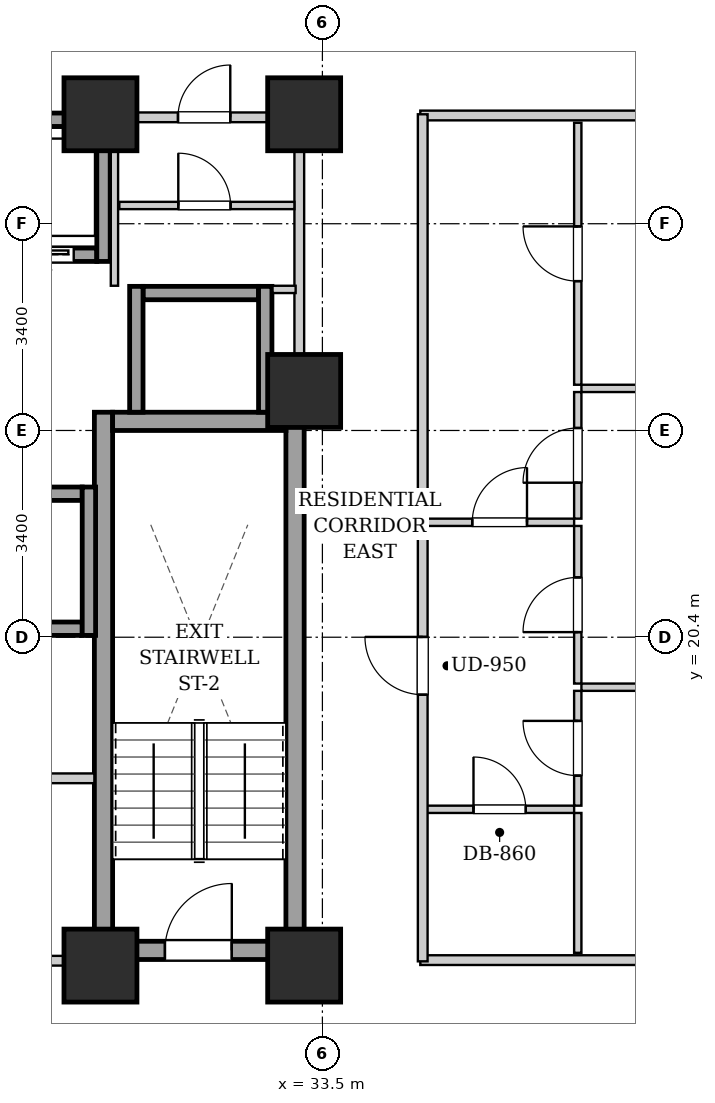
"""IFC4 building model, lengths in metres.
Left out: names, types, materials, properties, quantities, classifications, styles, units other than length and angle.
Written with IfcOpenShell. Run it as: python <this file> out.ifc"""

import sys

from ifc_helpers import new_model, si_unit, direction, frame, frame_2d, origin, origin_2d, place, context, subcontext, project, spatial, rectangle, extrude, element, fill, save


model = new_model("IFC4")
c1 = context("Model", 3, precision=1e-05, world=origin(), true_north=direction((0.0, 1.0)))
c2 = subcontext(c1, "Body", "Model", "MODEL_VIEW")
j1 = project(units=[si_unit("LENGTHUNIT", "METRE"), si_unit("PLANEANGLEUNIT", "RADIAN")], contexts=[c1])
p1 = place(None, origin())
s1 = spatial("IfcSite", under=j1, at=p1, CompositionType="ELEMENT")
p2 = place(p1, origin())
s2 = spatial("IfcBuilding", under=s1, at=p2, CompositionType="ELEMENT")
p3 = place(p2, frame((0.0, 0.0, 61.0)))
s3 = spatial("IfcBuildingStorey", under=s2, at=p3, CompositionType="ELEMENT", Elevation=61.0)
for number, where, z_axis, x_axis in (
    (1, (29.85, 15.0, 0.0), (0.0, 0.0, 1.0), (1.0, 0.0, 0.0)),
    (2, (33.2, 15.0, 0.0), (0.0, 0.0, 1.0), (1.0, 0.0, 0.0)),
    (3, (29.85, 29.0, 0.0), (0.0, 0.0, 1.0), (1.0, 0.0, 0.0)),
    (4, (33.2, 29.0, 0.0), (0.0, 0.0, 1.0), (1.0, 0.0, 0.0)),
    (5, (33.2, 24.45, 0.0), (0.0, 0.0, 1.0), (1.0, 0.0, 0.0)),
):
    element("IfcColumn", number, at=place(p3, frame(where, z_axis=z_axis, x_axis=x_axis)), inside=s3, PredefinedType="COLUMN", context=c2, shape_type="SweptSolid", body=[
        extrude(rectangle(XDim=1.2, YDim=1.2, at=origin_2d()), origin(), (0.0, 0.0, 1.0), 3.2),
    ])
for number, where, z_axis, x_axis in (
    (6, (29.9, 15.1, 0.0), (0.0, 0.0, 1.0), (0.0, 1.0, 0.0)),
    (7, (33.05, 15.1, 0.0), (0.0, 0.0, 1.0), (0.0, 1.0, 0.0)),
):
    element("IfcWall", number, at=place(p3, frame(where, z_axis=z_axis, x_axis=x_axis)), inside=s3, PredefinedType="SHEAR", context=c2, shape_type="SweptSolid", body=[
        extrude(rectangle(XDim=9.0, YDim=0.3, at=frame_2d((4.5, 0.0))), origin(), (0.0, 0.0, 1.0), 2.94),
    ])
p4 = place(p3, frame((30.05, 23.95, 0.0), z_axis=(0.0, 0.0, 1.0), x_axis=(1.0, 0.0, 0.0)))
e8 = element("IfcWall", 8, at=p4, inside=s3, PredefinedType="SHEAR", context=c2, shape_type="SweptSolid", body=[
    extrude(rectangle(XDim=2.85, YDim=0.3, at=frame_2d((1.425, 0.0))), origin(), (0.0, 0.0, 1.0), 2.94),
])
p5 = place(p3, frame((30.05, 15.25, 0.0), z_axis=(0.0, 0.0, 1.0), x_axis=(1.0, 0.0, 0.0)))
e9 = element("IfcWall", 9, at=p5, inside=s3, PredefinedType="SHEAR", context=c2, shape_type="SweptSolid", body=[
    extrude(rectangle(XDim=2.85, YDim=0.3, at=frame_2d((1.425, 0.0))), origin(), (0.0, 0.0, 1.0), 2.94),
])
p6 = place(p5, frame((0.86, 0.0, 0.0)))
e10 = element("IfcOpeningElement", 10, at=p6, cuts=e9, PredefinedType="OPENING", context=c2, shape_type="SweptSolid", body=[
    extrude(rectangle(XDim=1.1, YDim=2.05, at=frame_2d((0.55, 1.025))), frame((0.0, 0.16, 0.0), z_axis=(0.0, -1.0, 0.0), x_axis=(1.0, 0.0, 0.0)), (0.0, 0.0, 1.0), 0.32),
])
p7 = place(p3, frame((27.93, 26.69, 0.0), z_axis=(0.0, 0.0, 1.0), x_axis=(1.0, 0.0, 0.0)))
e11 = element("IfcWall", 11, at=p7, inside=s3, PredefinedType="SHEAR", context=c2, shape_type="SweptSolid", body=[
    extrude(rectangle(XDim=1.86, YDim=0.22, at=frame_2d((0.93, 0.0))), origin(), (0.0, 0.0, 1.0), 2.94),
])
p8 = place(p7, frame((0.38, 0.0, 0.0)))
e12 = element("IfcOpeningElement", 12, at=p8, cuts=e11, PredefinedType="OPENING", context=c2, shape_type="SweptSolid", body=[
    extrude(rectangle(XDim=1.1, YDim=2.15, at=frame_2d((0.55, 1.075))), frame((0.0, 0.12, 0.0), z_axis=(0.0, -1.0, 0.0), x_axis=(1.0, 0.0, 0.0)), (0.0, 0.0, 1.0), 0.24),
])
p9 = place(p3, frame((27.93, 28.91, 0.0), z_axis=(0.0, 0.0, 1.0), x_axis=(1.0, 0.0, 0.0)))
e13 = element("IfcWall", 13, at=p9, inside=s3, PredefinedType="SHEAR", context=c2, shape_type="SweptSolid", body=[
    extrude(rectangle(XDim=1.86, YDim=0.22, at=frame_2d((0.93, 0.0))), origin(), (0.0, 0.0, 1.0), 2.94),
])
p10 = place(p3, frame((29.9, 26.58, 0.0), z_axis=(0.0, 0.0, 1.0), x_axis=(0.0, 1.0, 0.0)))
e14 = element("IfcWall", 14, at=p10, inside=s3, PredefinedType="SHEAR", context=c2, shape_type="SweptSolid", body=[
    extrude(rectangle(XDim=2.44, YDim=0.22, at=frame_2d((1.22, 0.0))), origin(), (0.0, 0.0, 1.0), 2.94),
])
for number, where, z_axis, x_axis in (
    (15, (27.65, 20.54, 0.0), (0.0, 0.0, 1.0), (1.0, 0.0, 0.0)),
    (16, (27.65, 22.76, 0.0), (0.0, 0.0, 1.0), (1.0, 0.0, 0.0)),
):
    element("IfcWall", number, at=place(p3, frame(where, z_axis=z_axis, x_axis=x_axis)), inside=s3, PredefinedType="SHEAR", context=c2, shape_type="SweptSolid", body=[
        extrude(rectangle(XDim=1.9, YDim=0.22, at=frame_2d((0.95, 0.0))), origin(), (0.0, 0.0, 1.0), 2.94),
    ])
p11 = place(p3, frame((29.66, 20.43, 0.0), z_axis=(0.0, 0.0, 1.0), x_axis=(0.0, 1.0, 0.0)))
e17 = element("IfcWall", 17, at=p11, inside=s3, PredefinedType="SHEAR", context=c2, shape_type="SweptSolid", body=[
    extrude(rectangle(XDim=2.44, YDim=0.22, at=frame_2d((1.22, 0.0))), origin(), (0.0, 0.0, 1.0), 2.94),
])
p12 = place(p3, frame((30.55, 26.06, 0.0), z_axis=(0.0, 0.0, 1.0), x_axis=(1.0, 0.0, 0.0)))
e18 = element("IfcWall", 18, at=p12, inside=s3, PredefinedType="SHEAR", context=c2, shape_type="SweptSolid", body=[
    extrude(rectangle(XDim=1.9, YDim=0.22, at=frame_2d((0.95, 0.0))), origin(), (0.0, 0.0, 1.0), 2.94),
])
for number, where, z_axis, x_axis in (
    (19, (30.44, 24.1, 0.0), (0.0, 0.0, 1.0), (0.0, 1.0, 0.0)),
    (20, (32.56, 24.1, 0.0), (0.0, 0.0, 1.0), (0.0, 1.0, 0.0)),
):
    element("IfcWall", number, at=place(p3, frame(where, z_axis=z_axis, x_axis=x_axis)), inside=s3, PredefinedType="SHEAR", context=c2, shape_type="SweptSolid", body=[
        extrude(rectangle(XDim=2.07, YDim=0.22, at=frame_2d((1.035, 0.0))), origin(), (0.0, 0.0, 1.0), 2.94),
    ])
p13 = place(p3, frame((21.25, 15.08, 0.0), z_axis=(0.0, 0.0, 1.0), x_axis=(1.0, 0.0, 0.0)))
e21 = element("IfcWall", 21, at=p13, inside=s3, PredefinedType="PARTITIONING", context=c2, shape_type="SweptSolid", body=[
    extrude(rectangle(XDim=8.5, YDim=0.16, at=frame_2d((4.25, 0.0))), origin(), (0.0, 0.0, 1.0), 2.232),
])
p14 = place(p13, frame((3.725, 0.0, 0.0)))
e22 = element("IfcOpeningElement", 22, at=p14, cuts=e21, PredefinedType="OPENING", context=c2, shape_type="SweptSolid", body=[
    extrude(rectangle(XDim=1.05, YDim=2.05, at=frame_2d((0.525, 1.025))), frame((0.0, 0.09, 0.0), z_axis=(0.0, -1.0, 0.0), x_axis=(1.0, 0.0, 0.0)), (0.0, 0.0, 1.0), 0.18),
])
p15 = place(p3, frame((28.65, 18.08, 0.0), z_axis=(0.0, 0.0, 1.0), x_axis=(1.0, 0.0, 0.0)))
e23 = element("IfcWall", 23, at=p15, inside=s3, PredefinedType="PARTITIONING", context=c2, shape_type="SweptSolid", body=[
    extrude(rectangle(XDim=1.1, YDim=0.16, at=frame_2d((0.55, 0.0))), origin(), (0.0, 0.0, 1.0), 2.94),
])
p16 = place(p3, frame((33.12, 24.12, 0.0), z_axis=(0.0, 0.0, 1.0), x_axis=(0.0, 1.0, 0.0)))
e24 = element("IfcWall", 24, at=p16, inside=s3, PredefinedType="PARTITIONING", context=c2, shape_type="SweptSolid", body=[
    extrude(rectangle(XDim=4.76, YDim=0.16, at=frame_2d((2.38, 0.0))), origin(), (0.0, 0.0, 1.0), 2.94),
])
p17 = place(p3, frame((30.08, 26.18, 0.0), z_axis=(0.0, 0.0, 1.0), x_axis=(0.0, 1.0, 0.0)))
e25 = element("IfcWall", 25, at=p17, inside=s3, PredefinedType="PARTITIONING", context=c2, shape_type="SweptSolid", body=[
    extrude(rectangle(XDim=2.68, YDim=0.12, at=frame_2d((1.34, 0.0))), origin(), (0.0, 0.0, 1.0), 2.94),
])
p18 = place(p3, frame((32.68, 26.12, 0.0), z_axis=(0.0, 0.0, 1.0), x_axis=(1.0, 0.0, 0.0)))
e26 = element("IfcWall", 26, at=p18, inside=s3, PredefinedType="PARTITIONING", context=c2, shape_type="SweptSolid", body=[
    extrude(rectangle(XDim=0.38, YDim=0.12, at=frame_2d((0.19, 0.0))), origin(), (0.0, 0.0, 1.0), 2.94),
])
p19 = place(p3, frame((30.16, 27.5, 0.0), z_axis=(0.0, 0.0, 1.0), x_axis=(1.0, 0.0, 0.0)))
e27 = element("IfcWall", 27, at=p19, inside=s3, PredefinedType="PARTITIONING", context=c2, shape_type="SweptSolid", body=[
    extrude(rectangle(XDim=2.88, YDim=0.12, at=frame_2d((1.44, 0.0))), origin(), (0.0, 0.0, 1.0), 2.94),
])
p20 = place(p19, frame((0.97, 0.0, 0.0)))
e28 = element("IfcOpeningElement", 28, at=p20, cuts=e27, PredefinedType="OPENING", context=c2, shape_type="SweptSolid", body=[
    extrude(rectangle(XDim=0.86, YDim=2.05, at=frame_2d((0.43, 1.025))), frame((0.0, 0.07, 0.0), z_axis=(0.0, -1.0, 0.0), x_axis=(1.0, 0.0, 0.0)), (0.0, 0.0, 1.0), 0.14),
])
p21 = place(p3, frame((30.08, 28.95, 0.0), z_axis=(0.0, 0.0, 1.0), x_axis=(1.0, 0.0, 0.0)))
e29 = element("IfcWall", 29, at=p21, inside=s3, PredefinedType="PARTITIONING", context=c2, shape_type="SweptSolid", body=[
    extrude(rectangle(XDim=2.96, YDim=0.16, at=frame_2d((1.48, 0.0))), origin(), (0.0, 0.0, 1.0), 2.94),
])
p22 = place(p21, frame((1.045, 0.0, 0.0)))
e30 = element("IfcOpeningElement", 30, at=p22, cuts=e29, PredefinedType="OPENING", context=c2, shape_type="SweptSolid", body=[
    extrude(rectangle(XDim=0.86, YDim=2.05, at=frame_2d((0.43, 1.025))), frame((0.0, 0.09, 0.0), z_axis=(0.0, -1.0, 0.0), x_axis=(1.0, 0.0, 0.0)), (0.0, 0.0, 1.0), 0.18),
])
for number, where, z_axis, x_axis in (
    (31, (35.11, 15.09, 0.0), (0.0, 0.0, 1.0), (1.0, 0.0, 0.0)),
    (32, (35.11, 28.98, 0.0), (0.0, 0.0, 1.0), (1.0, 0.0, 0.0)),
):
    element("IfcWall", number, at=place(p3, frame(where, z_axis=z_axis, x_axis=x_axis)), inside=s3, PredefinedType="PARTITIONING", context=c2, shape_type="SweptSolid", body=[
        extrude(rectangle(XDim=11.11, YDim=0.16, at=frame_2d((5.555, 0.0))), origin(), (0.0, 0.0, 1.0), 2.232),
    ])
p23 = place(p3, frame((35.19, 22.29, 0.0), z_axis=(0.0, 0.0, 1.0), x_axis=(1.0, 0.0, 0.0)))
e33 = element("IfcWall", 33, at=p23, inside=s3, PredefinedType="PARTITIONING", context=c2, shape_type="SweptSolid", body=[
    extrude(rectangle(XDim=2.45, YDim=0.12, at=frame_2d((1.225, 0.0))), origin(), (0.0, 0.0, 1.0), 2.94),
])
p24 = place(p23, frame((0.775, 0.0, 0.0)))
e34 = element("IfcOpeningElement", 34, at=p24, cuts=e33, PredefinedType="OPENING", context=c2, shape_type="SweptSolid", body=[
    extrude(rectangle(XDim=0.9, YDim=2.05, at=frame_2d((0.45, 1.025))), frame((0.0, 0.07, 0.0), z_axis=(0.0, -1.0, 0.0), x_axis=(1.0, 0.0, 0.0)), (0.0, 0.0, 1.0), 0.14),
])
p25 = place(p3, frame((37.7, 22.35, 0.0), z_axis=(0.0, 0.0, 1.0), x_axis=(0.0, 1.0, 0.0)))
e35 = element("IfcWall", 35, at=p25, inside=s3, PredefinedType="PARTITIONING", context=c2, shape_type="SweptSolid", body=[
    extrude(rectangle(XDim=2.082, YDim=0.12, at=frame_2d((1.041, 0.0))), origin(), (0.0, 0.0, 1.0), 2.94),
])
p26 = place(p25, frame((0.591, 0.0, 0.0)))
e36 = element("IfcOpeningElement", 36, at=p26, cuts=e35, PredefinedType="OPENING", context=c2, shape_type="SweptSolid", body=[
    extrude(rectangle(XDim=0.9, YDim=2.05, at=frame_2d((0.45, 1.025))), frame((0.0, 0.07, 0.0), z_axis=(0.0, -1.0, 0.0), x_axis=(1.0, 0.0, 0.0)), (0.0, 0.0, 1.0), 0.14),
])
p27 = place(p3, frame((37.7, 24.552, 0.0), z_axis=(0.0, 0.0, 1.0), x_axis=(0.0, 1.0, 0.0)))
e37 = element("IfcWall", 37, at=p27, inside=s3, PredefinedType="PARTITIONING", context=c2, shape_type="SweptSolid", body=[
    extrude(rectangle(XDim=4.308, YDim=0.12, at=frame_2d((2.154, 0.0))), origin(), (0.0, 0.0, 1.0), 2.94),
])
p28 = place(p27, frame((1.704, 0.0, 0.0)))
e38 = element("IfcOpeningElement", 38, at=p28, cuts=e37, PredefinedType="OPENING", context=c2, shape_type="SweptSolid", body=[
    extrude(rectangle(XDim=0.9, YDim=2.05, at=frame_2d((0.45, 1.025))), frame((0.0, 0.07, 0.0), z_axis=(0.0, -1.0, 0.0), x_axis=(1.0, 0.0, 0.0)), (0.0, 0.0, 1.0), 0.14),
])
p29 = place(p3, frame((35.19, 17.57, 0.0), z_axis=(0.0, 0.0, 1.0), x_axis=(1.0, 0.0, 0.0)))
e39 = element("IfcWall", 39, at=p29, inside=s3, PredefinedType="PARTITIONING", context=c2, shape_type="SweptSolid", body=[
    extrude(rectangle(XDim=2.45, YDim=0.12, at=frame_2d((1.225, 0.0))), origin(), (0.0, 0.0, 1.0), 2.94),
])
p30 = place(p29, frame((0.795, 0.0, 0.0)))
e40 = element("IfcOpeningElement", 40, at=p30, cuts=e39, PredefinedType="OPENING", context=c2, shape_type="SweptSolid", body=[
    extrude(rectangle(XDim=0.86, YDim=2.05, at=frame_2d((0.43, 1.025))), frame((0.0, 0.07, 0.0), z_axis=(0.0, -1.0, 0.0), x_axis=(1.0, 0.0, 0.0)), (0.0, 0.0, 1.0), 0.14),
])
p31 = place(p3, frame((37.7, 15.21, 0.0), z_axis=(0.0, 0.0, 1.0), x_axis=(0.0, 1.0, 0.0)))
e41 = element("IfcWall", 41, at=p31, inside=s3, PredefinedType="PARTITIONING", context=c2, shape_type="SweptSolid", body=[
    extrude(rectangle(XDim=2.3, YDim=0.12, at=frame_2d((1.15, 0.0))), origin(), (0.0, 0.0, 1.0), 2.94),
])
p32 = place(p3, frame((37.7, 17.63, 0.0), z_axis=(0.0, 0.0, 1.0), x_axis=(0.0, 1.0, 0.0)))
e42 = element("IfcWall", 42, at=p32, inside=s3, PredefinedType="PARTITIONING", context=c2, shape_type="SweptSolid", body=[
    extrude(rectangle(XDim=1.888, YDim=0.12, at=frame_2d((0.944, 0.0))), origin(), (0.0, 0.0, 1.0), 2.94),
])
p33 = place(p32, frame((0.494, 0.0, 0.0)))
e43 = element("IfcOpeningElement", 43, at=p33, cuts=e42, PredefinedType="OPENING", context=c2, shape_type="SweptSolid", body=[
    extrude(rectangle(XDim=0.9, YDim=2.05, at=frame_2d((0.45, 1.025))), frame((0.0, 0.07, 0.0), z_axis=(0.0, -1.0, 0.0), x_axis=(1.0, 0.0, 0.0)), (0.0, 0.0, 1.0), 0.14),
])
p34 = place(p3, frame((37.7, 19.638, 0.0), z_axis=(0.0, 0.0, 1.0), x_axis=(0.0, 1.0, 0.0)))
e44 = element("IfcWall", 44, at=p34, inside=s3, PredefinedType="PARTITIONING", context=c2, shape_type="SweptSolid", body=[
    extrude(rectangle(XDim=2.592, YDim=0.12, at=frame_2d((1.296, 0.0))), origin(), (0.0, 0.0, 1.0), 2.94),
])
p35 = place(p34, frame((0.846, 0.0, 0.0)))
e45 = element("IfcOpeningElement", 45, at=p35, cuts=e44, PredefinedType="OPENING", context=c2, shape_type="SweptSolid", body=[
    extrude(rectangle(XDim=0.9, YDim=2.05, at=frame_2d((0.45, 1.025))), frame((0.0, 0.07, 0.0), z_axis=(0.0, -1.0, 0.0), x_axis=(1.0, 0.0, 0.0)), (0.0, 0.0, 1.0), 0.14),
])
p36 = place(p3, frame((37.76, 19.578, 0.0), z_axis=(0.0, 0.0, 1.0), x_axis=(1.0, 0.0, 0.0)))
e46 = element("IfcWall", 46, at=p36, inside=s3, PredefinedType="PARTITIONING", context=c2, shape_type="SweptSolid", body=[
    extrude(rectangle(XDim=6.31, YDim=0.12, at=frame_2d((3.155, 0.0))), origin(), (0.0, 0.0, 1.0), 2.94),
])
p37 = place(p36, frame((2.705, 0.0, 0.0)))
e47 = element("IfcOpeningElement", 47, at=p37, cuts=e46, PredefinedType="OPENING", context=c2, shape_type="SweptSolid", body=[
    extrude(rectangle(XDim=0.9, YDim=2.05, at=frame_2d((0.45, 1.025))), frame((0.0, 0.07, 0.0), z_axis=(0.0, -1.0, 0.0), x_axis=(1.0, 0.0, 0.0)), (0.0, 0.0, 1.0), 0.14),
])
p38 = place(p3, frame((37.76, 24.492, 0.0), z_axis=(0.0, 0.0, 1.0), x_axis=(1.0, 0.0, 0.0)))
e48 = element("IfcWall", 48, at=p38, inside=s3, PredefinedType="PARTITIONING", context=c2, shape_type="SweptSolid", body=[
    extrude(rectangle(XDim=6.31, YDim=0.12, at=frame_2d((3.155, 0.0))), origin(), (0.0, 0.0, 1.0), 2.508),
])
p39 = place(p38, frame((2.705, 0.0, 0.0)))
e49 = element("IfcOpeningElement", 49, at=p39, cuts=e48, PredefinedType="OPENING", context=c2, shape_type="SweptSolid", body=[
    extrude(rectangle(XDim=0.9, YDim=2.05, at=frame_2d((0.45, 1.025))), frame((0.0, 0.07, 0.0), z_axis=(0.0, -1.0, 0.0), x_axis=(1.0, 0.0, 0.0)), (0.0, 0.0, 1.0), 0.14),
])
p40 = place(p3, frame((35.15, 15.07, 0.0), z_axis=(0.0, 0.0, 1.0), x_axis=(0.0, 1.0, 0.0)))
e50 = element("IfcWall", 50, at=p40, inside=s3, PredefinedType="PARTITIONING", context=c2, shape_type="SweptSolid", body=[
    extrude(rectangle(XDim=13.93, YDim=0.16, at=frame_2d((6.965, 0.0))), origin(), (0.0, 0.0, 1.0), 2.94),
])
p41 = place(p40, frame((4.385, 0.0, 0.0)))
e51 = element("IfcOpeningElement", 51, at=p41, cuts=e50, PredefinedType="OPENING", context=c2, shape_type="SweptSolid", body=[
    extrude(rectangle(XDim=0.95, YDim=2.1, at=frame_2d((0.475, 1.05))), frame((0.0, 0.09, 0.0), z_axis=(0.0, -1.0, 0.0), x_axis=(1.0, 0.0, 0.0)), (0.0, 0.0, 1.0), 0.18),
])
p42 = place(p6, origin())
e52 = element("IfcDoor", 52, at=p42, inside=s3, OperationType="SINGLE_SWING_RIGHT", PredefinedType="DOOR", context=c2, shape_type="SweptSolid", body=[
    extrude(rectangle(XDim=1.1, YDim=2.05, at=frame_2d((0.55, 1.025))), frame((0.0, 0.025, 0.0), z_axis=(0.0, -1.0, 0.0), x_axis=(1.0, 0.0, 0.0)), (0.0, 0.0, 1.0), 0.05),
])
fill(e10, e52)
p43 = place(p8, origin())
e53 = element("IfcDoor", 53, at=p43, inside=s3, OperationType="SLIDING_TO_LEFT", PredefinedType="DOOR", context=c2, shape_type="SweptSolid", body=[
    extrude(rectangle(XDim=1.1, YDim=2.15, at=frame_2d((0.55, 1.075))), frame((0.0, 0.025, 0.0), z_axis=(0.0, -1.0, 0.0), x_axis=(1.0, 0.0, 0.0)), (0.0, 0.0, 1.0), 0.05),
])
fill(e12, e53)
p44 = place(p20, origin())
e54 = element("IfcDoor", 54, at=p44, inside=s3, OperationType="SINGLE_SWING_LEFT", PredefinedType="DOOR", context=c2, shape_type="SweptSolid", body=[
    extrude(rectangle(XDim=0.86, YDim=2.05, at=frame_2d((0.43, 1.025))), frame((0.0, 0.025, 0.0), z_axis=(0.0, -1.0, 0.0), x_axis=(1.0, 0.0, 0.0)), (0.0, 0.0, 1.0), 0.05),
])
fill(e28, e54)
p45 = place(p22, origin())
e55 = element("IfcDoor", 55, at=p45, inside=s3, OperationType="SINGLE_SWING_RIGHT", PredefinedType="DOOR", context=c2, shape_type="SweptSolid", body=[
    extrude(rectangle(XDim=0.86, YDim=2.05, at=frame_2d((0.43, 1.025))), frame((0.0, 0.025, 0.0), z_axis=(0.0, -1.0, 0.0), x_axis=(1.0, 0.0, 0.0)), (0.0, 0.0, 1.0), 0.05),
])
fill(e30, e55)
p46 = place(p24, origin())
e56 = element("IfcDoor", 56, at=p46, inside=s3, OperationType="SINGLE_SWING_RIGHT", PredefinedType="DOOR", context=c2, shape_type="SweptSolid", body=[
    extrude(rectangle(XDim=0.9, YDim=2.05, at=frame_2d((0.45, 1.025))), frame((0.0, 0.025, 0.0), z_axis=(0.0, -1.0, 0.0), x_axis=(1.0, 0.0, 0.0)), (0.0, 0.0, 1.0), 0.05),
])
fill(e34, e56)
p47 = place(p26, origin())
e57 = element("IfcDoor", 57, at=p47, inside=s3, OperationType="SINGLE_SWING_LEFT", PredefinedType="DOOR", context=c2, shape_type="SweptSolid", body=[
    extrude(rectangle(XDim=0.9, YDim=2.05, at=frame_2d((0.45, 1.025))), frame((0.0, 0.025, 0.0), z_axis=(0.0, -1.0, 0.0), x_axis=(1.0, 0.0, 0.0)), (0.0, 0.0, 1.0), 0.05),
])
fill(e36, e57)
p48 = place(p28, origin())
e58 = element("IfcDoor", 58, at=p48, inside=s3, OperationType="SINGLE_SWING_RIGHT", PredefinedType="DOOR", context=c2, shape_type="SweptSolid", body=[
    extrude(rectangle(XDim=0.9, YDim=2.05, at=frame_2d((0.45, 1.025))), frame((0.0, 0.025, 0.0), z_axis=(0.0, -1.0, 0.0), x_axis=(1.0, 0.0, 0.0)), (0.0, 0.0, 1.0), 0.05),
])
fill(e38, e58)
p49 = place(p30, origin())
e59 = element("IfcDoor", 59, at=p49, inside=s3, OperationType="SINGLE_SWING_LEFT", PredefinedType="DOOR", context=c2, shape_type="SweptSolid", body=[
    extrude(rectangle(XDim=0.86, YDim=2.05, at=frame_2d((0.43, 1.025))), frame((0.0, 0.025, 0.0), z_axis=(0.0, -1.0, 0.0), x_axis=(1.0, 0.0, 0.0)), (0.0, 0.0, 1.0), 0.05),
])
fill(e40, e59)
p50 = place(p33, origin())
e60 = element("IfcDoor", 60, at=p50, inside=s3, OperationType="SINGLE_SWING_RIGHT", PredefinedType="DOOR", context=c2, shape_type="SweptSolid", body=[
    extrude(rectangle(XDim=0.9, YDim=2.05, at=frame_2d((0.45, 1.025))), frame((0.0, 0.025, 0.0), z_axis=(0.0, -1.0, 0.0), x_axis=(1.0, 0.0, 0.0)), (0.0, 0.0, 1.0), 0.05),
])
fill(e43, e60)
p51 = place(p35, origin())
e61 = element("IfcDoor", 61, at=p51, inside=s3, OperationType="SINGLE_SWING_LEFT", PredefinedType="DOOR", context=c2, shape_type="SweptSolid", body=[
    extrude(rectangle(XDim=0.9, YDim=2.05, at=frame_2d((0.45, 1.025))), frame((0.0, 0.025, 0.0), z_axis=(0.0, -1.0, 0.0), x_axis=(1.0, 0.0, 0.0)), (0.0, 0.0, 1.0), 0.05),
])
fill(e45, e61)
p52 = place(p41, origin())
e62 = element("IfcDoor", 62, at=p52, inside=s3, OperationType="SINGLE_SWING_RIGHT", PredefinedType="DOOR", context=c2, shape_type="SweptSolid", body=[
    extrude(rectangle(XDim=0.95, YDim=2.1, at=frame_2d((0.475, 1.05))), frame((0.0, 0.025, 0.0), z_axis=(0.0, -1.0, 0.0), x_axis=(1.0, 0.0, 0.0)), (0.0, 0.0, 1.0), 0.05),
])
fill(e51, e62)
save(model, sys.argv[1])
